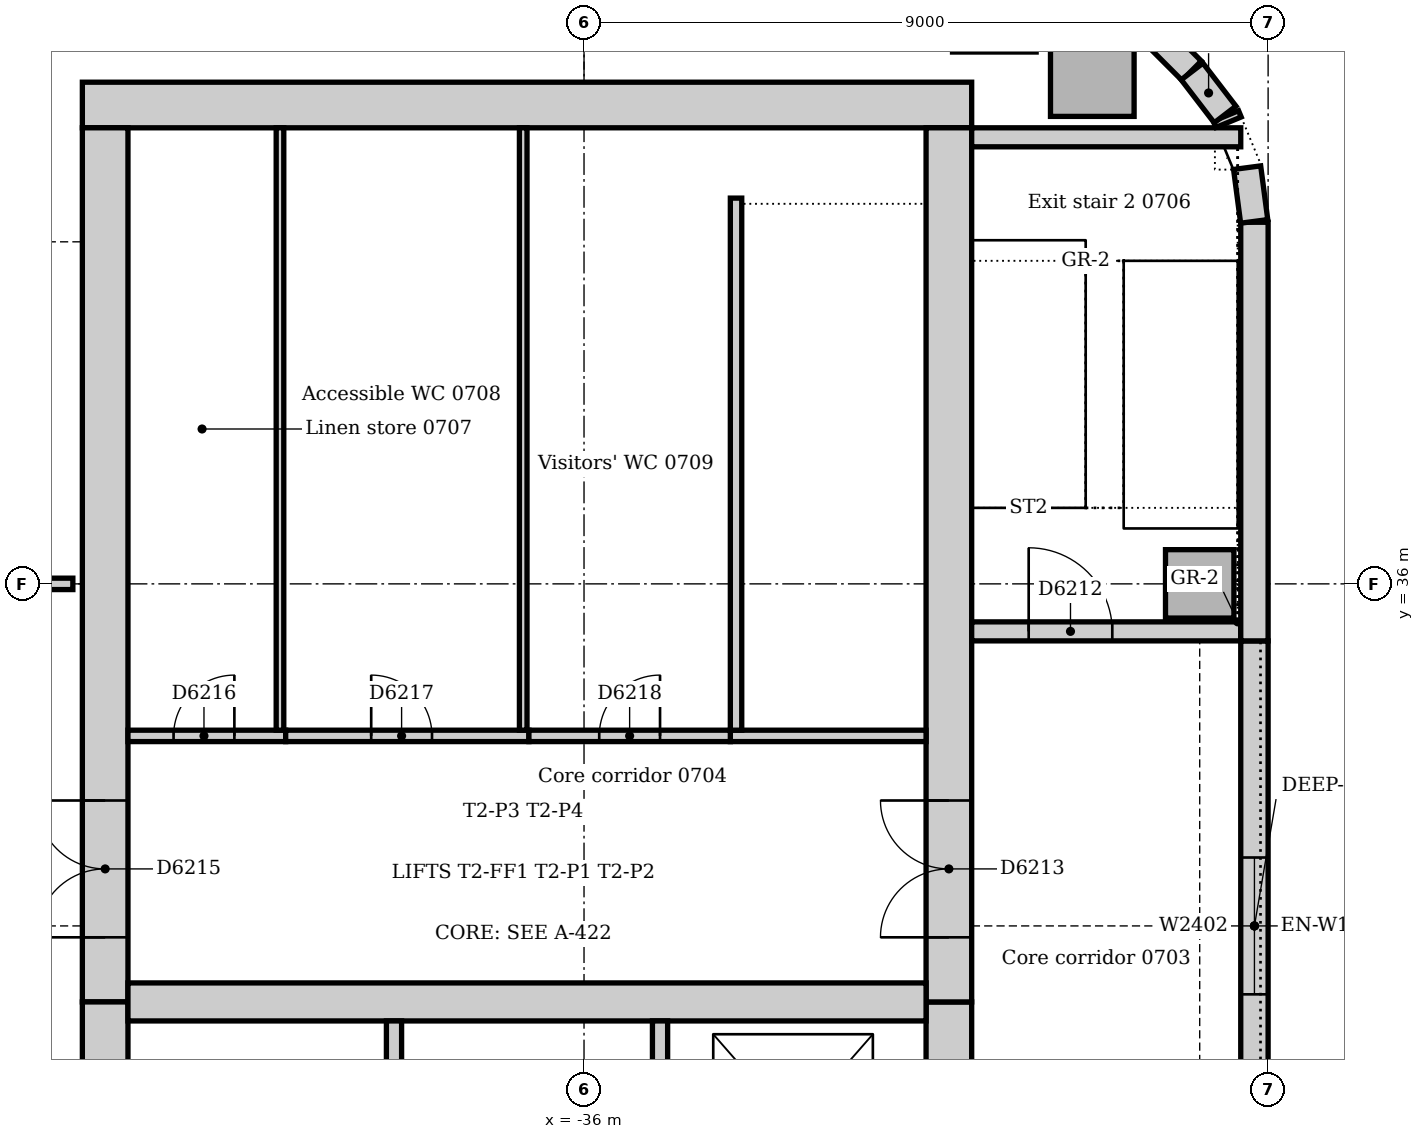
"""IFC4 building model, lengths in metres.
Left out: names, types, materials, properties, quantities, classifications, styles, units other than length and angle.
Written with IfcOpenShell. Run it as: python <this file> out.ifc"""

import sys

from ifc_helpers import new_model, si_unit, direction, frame, frame_2d, origin, origin_2d, place, context, subcontext, project, spatial, rectangle, extrude, element, fill, save


model = new_model("IFC4")
c1 = context("Model", 3, precision=1e-05, world=origin(), true_north=direction((0.0, 1.0)))
c2 = subcontext(c1, "Body", "Model", "MODEL_VIEW")
j1 = project(units=[si_unit("LENGTHUNIT", "METRE"), si_unit("PLANEANGLEUNIT", "RADIAN")], contexts=[c1])
p1 = place(None, origin())
s1 = spatial("IfcSite", under=j1, at=p1, CompositionType="ELEMENT")
p2 = place(p1, origin())
s2 = spatial("IfcBuilding", under=s1, at=p2, CompositionType="ELEMENT")
p3 = place(p2, frame((0.0, 0.0, 34.0)))
s3 = spatial("IfcBuildingStorey", under=s2, at=p3, CompositionType="ELEMENT", Elevation=34.0)
p4 = place(p3, frame((-30.9, 42.3, 0.0), z_axis=(0.0, 0.0, 1.0), x_axis=(-1.0, 0.0, 0.0)))
e1 = element("IfcWall", 1, at=p4, inside=s3, PredefinedType="SOLIDWALL", context=c2, shape_type="SweptSolid", body=[
    extrude(rectangle(XDim=11.7, YDim=0.6, at=frame_2d((5.85, 0.0))), origin(), (0.0, 0.0, 1.0), 4.0),
])
p5 = place(p3, frame((-31.2, 21.0, 0.0), z_axis=(0.0, 0.0, 1.0), x_axis=(0.0, 1.0, 0.0)))
e2 = element("IfcWall", 2, at=p5, inside=s3, PredefinedType="SOLIDWALL", context=c2, shape_type="SweptSolid", body=[
    extrude(rectangle(XDim=9.5, YDim=0.6, at=frame_2d((4.75, 0.0))), origin(), (0.0, 0.0, 1.0), 4.0),
])
p6 = place(p5, frame((5.25, 0.0, 0.0)))
e3 = element("IfcOpeningElement", 3, at=p6, cuts=e2, PredefinedType="OPENING", context=c2, shape_type="SweptSolid", body=[
    extrude(rectangle(XDim=1.0, YDim=2.1, at=frame_2d((0.5, 1.05))), frame((0.0, 0.31, 0.0), z_axis=(0.0, -1.0, 0.0), x_axis=(1.0, 0.0, 0.0)), (0.0, 0.0, 1.0), 0.62),
])
p7 = place(p3, frame((-31.2, 30.5, 0.0), z_axis=(0.0, 0.0, 1.0), x_axis=(0.0, 1.0, 0.0)))
e4 = element("IfcWall", 4, at=p7, inside=s3, PredefinedType="SOLIDWALL", context=c2, shape_type="SweptSolid", body=[
    extrude(rectangle(XDim=11.5, YDim=0.6, at=frame_2d((5.75, 0.0))), origin(), (0.0, 0.0, 1.0), 4.0),
])
p8 = place(p7, frame((0.85, 0.0, 0.0)))
e5 = element("IfcOpeningElement", 5, at=p8, cuts=e4, PredefinedType="OPENING", context=c2, shape_type="SweptSolid", body=[
    extrude(rectangle(XDim=1.8, YDim=2.1, at=frame_2d((0.9, 1.05))), frame((0.0, 0.31, 0.0), z_axis=(0.0, -1.0, 0.0), x_axis=(1.0, 0.0, 0.0)), (0.0, 0.0, 1.0), 0.62),
])
p9 = place(p3, frame((-42.3, 42.0, 0.0), z_axis=(0.0, 0.0, 1.0), x_axis=(0.0, -1.0, 0.0)))
e6 = element("IfcWall", 6, at=p9, inside=s3, PredefinedType="SOLIDWALL", context=c2, shape_type="SweptSolid", body=[
    extrude(rectangle(XDim=11.5, YDim=0.6, at=frame_2d((5.75, 0.0))), origin(), (0.0, 0.0, 1.0), 4.0),
])
p10 = place(p9, frame((8.85, 0.0, 0.0)))
e7 = element("IfcOpeningElement", 7, at=p10, cuts=e6, PredefinedType="OPENING", context=c2, shape_type="SweptSolid", body=[
    extrude(rectangle(XDim=1.8, YDim=2.1, at=frame_2d((0.9, 1.05))), frame((0.0, 0.31, 0.0), z_axis=(0.0, -1.0, 0.0), x_axis=(1.0, 0.0, 0.0)), (0.0, 0.0, 1.0), 0.62),
])
p11 = place(p3, frame((-42.3, 30.5, 0.0), z_axis=(0.0, 0.0, 1.0), x_axis=(0.0, -1.0, 0.0)))
e8 = element("IfcWall", 8, at=p11, inside=s3, PredefinedType="SOLIDWALL", context=c2, shape_type="SweptSolid", body=[
    extrude(rectangle(XDim=9.5, YDim=0.6, at=frame_2d((4.75, 0.0))), origin(), (0.0, 0.0, 1.0), 4.0),
])
p12 = place(p11, frame((3.85, 0.0, 0.0)))
e9 = element("IfcOpeningElement", 9, at=p12, cuts=e8, PredefinedType="OPENING", context=c2, shape_type="SweptSolid", body=[
    extrude(rectangle(XDim=1.8, YDim=2.1, at=frame_2d((0.9, 1.05))), frame((0.0, 0.31, 0.0), z_axis=(0.0, -1.0, 0.0), x_axis=(1.0, 0.0, 0.0)), (0.0, 0.0, 1.0), 0.62),
])
p13 = place(p3, frame((-42.0, 30.5, 0.0), z_axis=(0.0, 0.0, 1.0), x_axis=(1.0, 0.0, 0.0)))
e10 = element("IfcWall", 10, at=p13, inside=s3, PredefinedType="SOLIDWALL", context=c2, shape_type="SweptSolid", body=[
    extrude(rectangle(XDim=10.5, YDim=0.5, at=frame_2d((5.25, 0.0))), origin(), (0.0, 0.0, 1.0), 4.0),
])
p14 = place(p3, frame((-30.9, 35.375, 0.0), z_axis=(0.0, 0.0, 1.0), x_axis=(1.0, 0.0, 0.0)))
e11 = element("IfcWall", 11, at=p14, inside=s3, PredefinedType="SOLIDWALL", context=c2, shape_type="SweptSolid", body=[
    extrude(rectangle(XDim=3.54, YDim=0.25, at=frame_2d((1.77, 0.0))), origin(), (0.0, 0.0, 1.0), 4.0),
])
p15 = place(p14, frame((0.75, 0.0, 0.0)))
e12 = element("IfcOpeningElement", 12, at=p15, cuts=e11, PredefinedType="OPENING", context=c2, shape_type="SweptSolid", body=[
    extrude(rectangle(XDim=1.1, YDim=2.1, at=frame_2d((0.55, 1.05))), frame((0.0, 0.135, 0.0), z_axis=(0.0, -1.0, 0.0), x_axis=(1.0, 0.0, 0.0)), (0.0, 0.0, 1.0), 0.27),
])
p16 = place(p3, frame((-27.36, 41.875, 0.0), z_axis=(0.0, 0.0, 1.0), x_axis=(-1.0, 0.0, 0.0)))
e13 = element("IfcWall", 13, at=p16, inside=s3, PredefinedType="SOLIDWALL", context=c2, shape_type="SweptSolid", body=[
    extrude(rectangle(XDim=3.54, YDim=0.25, at=frame_2d((1.77, 0.0))), origin(), (0.0, 0.0, 1.0), 4.0),
])
for number, where, z_axis, x_axis in (
    (14, (-29.313, 42.7, 0.0), (0.0, 0.0, 1.0), (1.0, 0.0, 0.0)),
    (15, (-30.602, 43.547, 0.0), (0.0, 0.0, 1.0), (1.0, 0.0, 0.0)),
):
    element("IfcColumn", number, at=place(p3, frame(where, z_axis=z_axis, x_axis=x_axis)), inside=s3, PredefinedType="COLUMN", context=c2, shape_type="SweptSolid", body=[
        extrude(rectangle(XDim=1.1, YDim=1.1, at=origin_2d()), origin(), (0.0, 0.0, 1.0), 3.85),
    ])
p17 = place(p3, frame((-27.9, 36.0, 0.0), z_axis=(0.0, 0.0, 1.0), x_axis=(1.0, 0.0, 0.0)))
e16 = element("IfcColumn", 16, at=p17, inside=s3, PredefinedType="COLUMN", context=c2, shape_type="SweptSolid", body=[
    extrude(rectangle(XDim=0.9, YDim=0.9, at=origin_2d()), origin(), (0.0, 0.0, 1.0), 4.0),
])
p18 = place(p3, frame((-27.18, 27.75, 0.0), z_axis=(0.0, 0.0, 1.0), x_axis=(0.0, 1.0, 0.0)))
e17 = element("IfcWall", 17, at=p18, inside=s3, PredefinedType="STANDARD", context=c2, shape_type="SweptSolid", body=[
    extrude(rectangle(XDim=7.5, YDim=0.36, at=frame_2d((3.75, 0.0))), origin(), (0.0, 0.0, 1.0), 3.85),
])
p19 = place(p18, frame((2.85, 0.0, 1.2)))
e18 = element("IfcOpeningElement", 18, at=p19, cuts=e17, PredefinedType="OPENING", context=c2, shape_type="SweptSolid", body=[
    extrude(rectangle(XDim=1.8, YDim=1.2, at=frame_2d((0.9, 0.6))), frame((0.0, 0.19, 0.0), z_axis=(0.0, -1.0, 0.0), x_axis=(1.0, 0.0, 0.0)), (0.0, 0.0, 1.0), 0.38),
])
p20 = place(p3, frame((-27.18, 35.25, 0.0), z_axis=(0.0, 0.0, 1.0), x_axis=(0.0, 1.0, 0.0)))
e19 = element("IfcWall", 19, at=p20, inside=s3, PredefinedType="STANDARD", context=c2, shape_type="SweptSolid", body=[
    extrude(rectangle(XDim=5.507, YDim=0.36, at=frame_2d((2.754, 0.0))), origin(), (0.0, 0.0, 1.0), 3.85),
])
p21 = place(p3, frame((-28.006, 42.751, 0.0), z_axis=(0.0, 0.0, 1.0), x_axis=(-0.707106781187, 0.707106781187, 0.0)))
e20 = element("IfcWall", 20, at=p21, inside=s3, PredefinedType="STANDARD", context=c2, shape_type="SweptSolid", body=[
    extrude(rectangle(XDim=1.757, YDim=0.36, at=frame_2d((0.879, 0.0))), origin(), (0.0, 0.0, 1.0), 3.85),
])
p22 = place(p3, frame((-27.183, 40.769, 0.0), z_axis=(0.0, 0.0, 1.0), x_axis=(-0.13055608231, 0.99144092581, 0.0)))
e21 = element("IfcWall", 21, at=p22, inside=s3, PredefinedType="STANDARD", context=c2, shape_type="SweptSolid", body=[
    extrude(rectangle(XDim=0.713, YDim=0.36, at=frame_2d((0.356, 0.0))), origin(), (0.0, 0.0, 1.0), 3.85),
])
p23 = place(p3, frame((-27.521, 42.074, 0.0), z_axis=(0.0, 0.0, 1.0), x_axis=(-0.382549378284, 0.923935048136, 0.0)))
e22 = element("IfcWall", 22, at=p23, inside=s3, PredefinedType="STANDARD", context=c2, shape_type="SweptSolid", body=[
    extrude(rectangle(XDim=0.089, YDim=0.36, at=frame_2d((0.045, 0.0))), origin(), (0.0, 0.0, 1.0), 3.85),
])
p24 = place(p3, frame((-27.566, 42.175, 0.0), z_axis=(0.0, 0.0, 1.0), x_axis=(-0.608802368033, 0.793321924995, 0.0)))
e23 = element("IfcWall", 23, at=p24, inside=s3, PredefinedType="STANDARD", context=c2, shape_type="SweptSolid", body=[
    extrude(rectangle(XDim=0.713, YDim=0.36, at=frame_2d((0.357, 0.0))), origin(), (0.0, 0.0, 1.0), 3.85),
])
for number, where, z_axis, x_axis in (
    (24, (-38.5, 27.4, 0.0), (0.0, 0.0, 1.0), (0.0, 1.0, 0.0)),
    (25, (-35.0, 27.4, 0.0), (0.0, 0.0, 1.0), (0.0, 1.0, 0.0)),
):
    element("IfcWall", number, at=place(p3, frame(where, z_axis=z_axis, x_axis=x_axis)), inside=s3, PredefinedType="SOLIDWALL", context=c2, shape_type="SweptSolid", body=[
        extrude(rectangle(XDim=2.85, YDim=0.2, at=frame_2d((1.425, 0.0))), origin(), (0.0, 0.0, 1.0), 4.0),
    ])
p25 = place(p3, frame((-34.075, 34.0, 0.0), z_axis=(0.0, 0.0, 1.0), x_axis=(1.0, 0.0, 0.0)))
e26 = element("IfcWall", 26, at=p25, inside=s3, PredefinedType="SOLIDWALL", context=c2, shape_type="SweptSolid", body=[
    extrude(rectangle(XDim=2.575, YDim=0.15, at=frame_2d((1.288, 0.0))), origin(), (0.0, 0.0, 1.0), 4.0),
])
p26 = place(p3, frame((-34.0, 41.075, 0.0), z_axis=(0.0, 0.0, 1.0), x_axis=(0.0, -1.0, 0.0)))
e27 = element("IfcWall", 27, at=p26, inside=s3, PredefinedType="SOLIDWALL", context=c2, shape_type="SweptSolid", body=[
    extrude(rectangle(XDim=7.0, YDim=0.15, at=frame_2d((3.5, 0.0))), origin(), (0.0, 0.0, 1.0), 4.0),
])
p27 = place(p3, frame((-39.925, 34.0, 0.0), z_axis=(0.0, 0.0, 1.0), x_axis=(-1.0, 0.0, 0.0)))
e28 = element("IfcWall", 28, at=p27, inside=s3, PredefinedType="PARTITIONING", context=c2, shape_type="SweptSolid", body=[
    extrude(rectangle(XDim=2.075, YDim=0.15, at=frame_2d((1.038, 0.0))), origin(), (0.0, 0.0, 1.0), 3.85),
])
p28 = place(p27, frame((0.675, 0.0, 0.0)))
e29 = element("IfcOpeningElement", 29, at=p28, cuts=e28, PredefinedType="OPENING", context=c2, shape_type="SweptSolid", body=[
    extrude(rectangle(XDim=0.8, YDim=2.1, at=frame_2d((0.4, 1.05))), frame((0.0, 0.085, 0.0), z_axis=(0.0, -1.0, 0.0), x_axis=(1.0, 0.0, 0.0)), (0.0, 0.0, 1.0), 0.17),
])
p29 = place(p3, frame((-36.725, 34.0, 0.0), z_axis=(0.0, 0.0, 1.0), x_axis=(-1.0, 0.0, 0.0)))
e30 = element("IfcWall", 30, at=p29, inside=s3, PredefinedType="PARTITIONING", context=c2, shape_type="SweptSolid", body=[
    extrude(rectangle(XDim=3.2, YDim=0.15, at=frame_2d((1.6, 0.0))), origin(), (0.0, 0.0, 1.0), 3.85),
])
p30 = place(p29, frame((1.275, 0.0, 0.0)))
e31 = element("IfcOpeningElement", 31, at=p30, cuts=e30, PredefinedType="OPENING", context=c2, shape_type="SweptSolid", body=[
    extrude(rectangle(XDim=0.8, YDim=2.1, at=frame_2d((0.4, 1.05))), frame((0.0, 0.085, 0.0), z_axis=(0.0, -1.0, 0.0), x_axis=(1.0, 0.0, 0.0)), (0.0, 0.0, 1.0), 0.17),
])
p31 = place(p3, frame((-34.075, 34.0, 0.0), z_axis=(0.0, 0.0, 1.0), x_axis=(-1.0, 0.0, 0.0)))
e32 = element("IfcWall", 32, at=p31, inside=s3, PredefinedType="PARTITIONING", context=c2, shape_type="SweptSolid", body=[
    extrude(rectangle(XDim=2.65, YDim=0.15, at=frame_2d((1.325, 0.0))), origin(), (0.0, 0.0, 1.0), 3.85),
])
p32 = place(p31, frame((0.925, 0.0, 0.0)))
e33 = element("IfcOpeningElement", 33, at=p32, cuts=e32, PredefinedType="OPENING", context=c2, shape_type="SweptSolid", body=[
    extrude(rectangle(XDim=0.8, YDim=2.1, at=frame_2d((0.4, 1.05))), frame((0.0, 0.085, 0.0), z_axis=(0.0, -1.0, 0.0), x_axis=(1.0, 0.0, 0.0)), (0.0, 0.0, 1.0), 0.17),
])
for number, where, z_axis, x_axis in (
    (34, (-40.0, 34.075, 0.0), (0.0, 0.0, 1.0), (0.0, 1.0, 0.0)),
    (35, (-36.8, 34.075, 0.0), (0.0, 0.0, 1.0), (0.0, 1.0, 0.0)),
):
    element("IfcWall", number, at=place(p3, frame(where, z_axis=z_axis, x_axis=x_axis)), inside=s3, PredefinedType="PARTITIONING", context=c2, shape_type="SweptSolid", body=[
        extrude(rectangle(XDim=7.925, YDim=0.1, at=frame_2d((3.962, 0.0))), origin(), (0.0, 0.0, 1.0), 3.85),
    ])
p33 = place(p3, frame((-44.6, 36.0, 0.0), z_axis=(0.0, 0.0, 1.0), x_axis=(1.0, 0.0, 0.0)))
e36 = element("IfcWall", 36, at=p33, inside=s3, PredefinedType="PARTITIONING", context=c2, shape_type="SweptSolid", body=[
    extrude(rectangle(XDim=1.875, YDim=0.15, at=frame_2d((0.938, 0.0))), origin(), (0.0, 0.0, 1.0), 3.602),
])
p34 = place(p33, frame((0.5, 0.0, 0.0)))
e37 = element("IfcOpeningElement", 37, at=p34, cuts=e36, PredefinedType="OPENING", context=c2, shape_type="SweptSolid", body=[
    extrude(rectangle(XDim=0.9, YDim=2.1, at=frame_2d((0.45, 1.05))), frame((0.0, 0.085, 0.0), z_axis=(0.0, -1.0, 0.0), x_axis=(1.0, 0.0, 0.0)), (0.0, 0.0, 1.0), 0.17),
])
p35 = place(p19, origin())
e38 = element("IfcWindow", 38, at=p35, inside=s3, PartitioningType="SINGLE_PANEL", PredefinedType="WINDOW", context=c2, shape_type="SweptSolid", body=[
    extrude(rectangle(XDim=1.8, YDim=1.2, at=frame_2d((0.9, 0.6))), frame((0.0, 0.13, 0.0), z_axis=(0.0, -1.0, 0.0), x_axis=(1.0, 0.0, 0.0)), (0.0, 0.0, 1.0), 0.06),
])
fill(e18, e38)
p36 = place(p15, origin())
e39 = element("IfcDoor", 39, at=p36, inside=s3, OperationType="SINGLE_SWING_LEFT", PredefinedType="DOOR", context=c2, shape_type="SweptSolid", body=[
    extrude(rectangle(XDim=1.1, YDim=2.1, at=frame_2d((0.55, 1.05))), frame((0.0, 0.025, 0.0), z_axis=(0.0, -1.0, 0.0), x_axis=(1.0, 0.0, 0.0)), (0.0, 0.0, 1.0), 0.05),
])
fill(e12, e39)
p37 = place(p8, origin())
e40 = element("IfcDoor", 40, at=p37, inside=s3, OperationType="DOUBLE_DOOR_SINGLE_SWING", PredefinedType="DOOR", context=c2, shape_type="SweptSolid", body=[
    extrude(rectangle(XDim=1.8, YDim=2.1, at=frame_2d((0.9, 1.05))), frame((0.0, 0.025, 0.0), z_axis=(0.0, -1.0, 0.0), x_axis=(1.0, 0.0, 0.0)), (0.0, 0.0, 1.0), 0.05),
])
fill(e5, e40)
p38 = place(p10, frame((1.8, 0.0, 0.0), z_axis=(0.0, 0.0, 1.0), x_axis=(-1.0, 0.0, 0.0)))
e41 = element("IfcDoor", 41, at=p38, inside=s3, OperationType="DOUBLE_DOOR_SINGLE_SWING", PredefinedType="DOOR", context=c2, shape_type="SweptSolid", body=[
    extrude(rectangle(XDim=1.8, YDim=2.1, at=frame_2d((0.9, 1.05))), frame((0.0, 0.025, 0.0), z_axis=(0.0, -1.0, 0.0), x_axis=(1.0, 0.0, 0.0)), (0.0, 0.0, 1.0), 0.05),
])
fill(e7, e41)
p39 = place(p28, frame((0.8, 0.0, 0.0), z_axis=(0.0, 0.0, 1.0), x_axis=(-1.0, 0.0, 0.0)))
e42 = element("IfcDoor", 42, at=p39, inside=s3, OperationType="SINGLE_SWING_RIGHT", PredefinedType="DOOR", context=c2, shape_type="SweptSolid", body=[
    extrude(rectangle(XDim=0.8, YDim=2.1, at=frame_2d((0.4, 1.05))), frame((0.0, 0.025, 0.0), z_axis=(0.0, -1.0, 0.0), x_axis=(1.0, 0.0, 0.0)), (0.0, 0.0, 1.0), 0.05),
])
fill(e29, e42)
p40 = place(p30, frame((0.8, 0.0, 0.0), z_axis=(0.0, 0.0, 1.0), x_axis=(-1.0, 0.0, 0.0)))
e43 = element("IfcDoor", 43, at=p40, inside=s3, OperationType="SINGLE_SWING_LEFT", PredefinedType="DOOR", context=c2, shape_type="SweptSolid", body=[
    extrude(rectangle(XDim=0.8, YDim=2.1, at=frame_2d((0.4, 1.05))), frame((0.0, 0.025, 0.0), z_axis=(0.0, -1.0, 0.0), x_axis=(1.0, 0.0, 0.0)), (0.0, 0.0, 1.0), 0.05),
])
fill(e31, e43)
p41 = place(p32, frame((0.8, 0.0, 0.0), z_axis=(0.0, 0.0, 1.0), x_axis=(-1.0, 0.0, 0.0)))
e44 = element("IfcDoor", 44, at=p41, inside=s3, OperationType="SINGLE_SWING_RIGHT", PredefinedType="DOOR", context=c2, shape_type="SweptSolid", body=[
    extrude(rectangle(XDim=0.8, YDim=2.1, at=frame_2d((0.4, 1.05))), frame((0.0, 0.025, 0.0), z_axis=(0.0, -1.0, 0.0), x_axis=(1.0, 0.0, 0.0)), (0.0, 0.0, 1.0), 0.05),
])
fill(e33, e44)
save(model, sys.argv[1])
